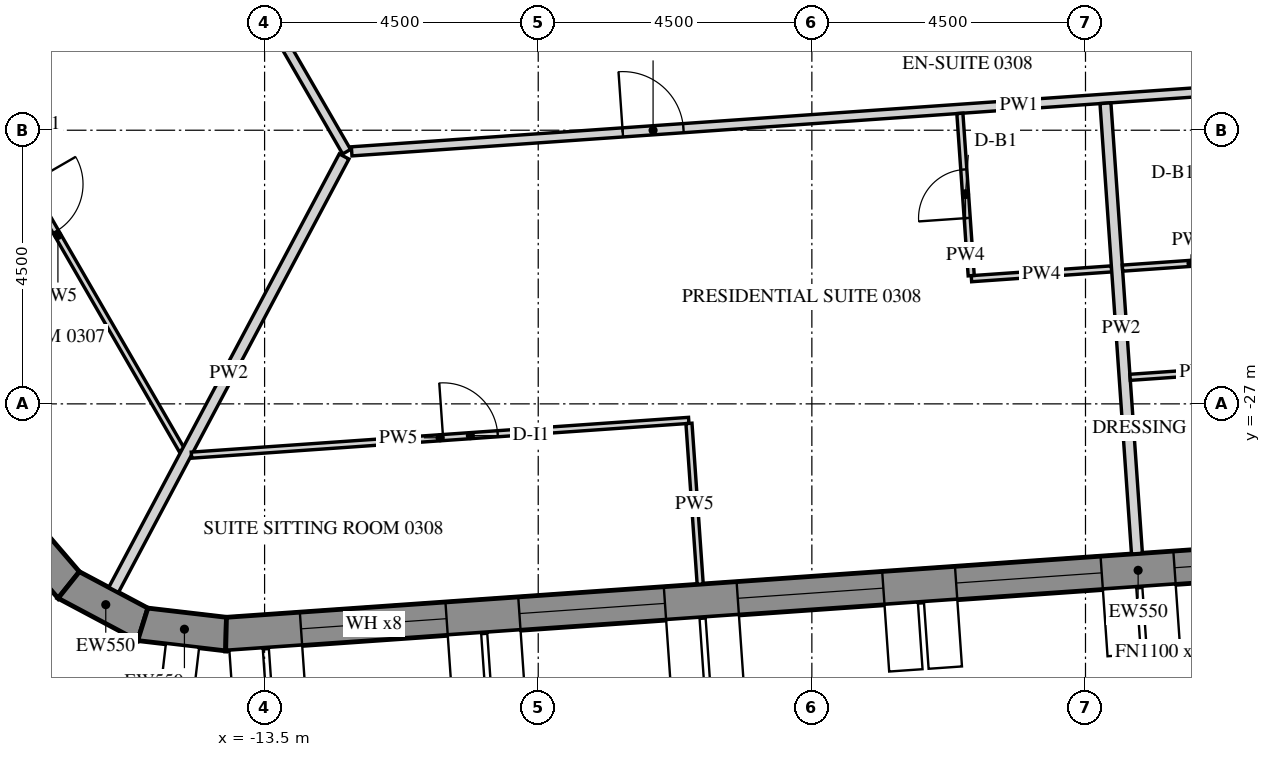
"""IFC4 building model, lengths in metres.
Left out: names, types, materials, properties, quantities, classifications, styles, units other than length and angle.
Written with IfcOpenShell. Run it as: python <this file> out.ifc"""

import sys

from ifc_helpers import new_model, si_unit, direction, frame, frame_2d, origin, place, context, subcontext, project, spatial, polyline, rectangle, outline, extrude, element, fill, save


model = new_model("IFC4")
c1 = context("Model", 3, precision=1e-05, world=origin(), true_north=direction((0.0, 1.0)))
c2 = subcontext(c1, "Body", "Model", "MODEL_VIEW")
j1 = project(units=[si_unit("LENGTHUNIT", "METRE"), si_unit("PLANEANGLEUNIT", "RADIAN")], contexts=[c1])
p1 = place(None, origin())
s1 = spatial("IfcSite", under=j1, at=p1, CompositionType="ELEMENT")
p2 = place(p1, origin())
s2 = spatial("IfcBuilding", under=s1, at=p2, CompositionType="ELEMENT")
p3 = place(p2, frame((0.0, 0.0, 60.9)))
s3 = spatial("IfcBuildingStorey", under=s2, at=p3, CompositionType="ELEMENT", Elevation=60.9)
p4 = place(p3, frame((-17.619, -28.932, -0.15), z_axis=(0.0, 0.0, 1.0), x_axis=(0.651621950847, -0.758543890078, 0.0)))
e1 = element("IfcWall", 1, at=p4, inside=s3, PredefinedType="SOLIDWALL", context=c2, shape_type="SweptSolid", body=[
    extrude(outline(polyline([(-0.026, -0.275), (1.431, -0.275), (1.327, 0.275), (0.026, 0.275), (-0.026, -0.275)])), origin(), (0.0, 0.0, 1.0), 3.9),
])
p5 = place(p3, frame((-16.721, -29.979, -0.15), z_axis=(0.0, 0.0, 1.0), x_axis=(0.882994189209, -0.469383917304, 0.0)))
e2 = element("IfcWall", 2, at=p5, inside=s3, PredefinedType="SOLIDWALL", context=c2, shape_type="SweptSolid", body=[
    extrude(outline(polyline([(-0.052, -0.275), (1.431, -0.275), (1.327, 0.275), (0.052, 0.275), (-0.052, -0.275)])), origin(), (0.0, 0.0, 1.0), 3.9),
])
p6 = place(p3, frame((-15.503, -30.626, -0.15), z_axis=(0.0, 0.0, 1.0), x_axis=(0.993232537394, -0.11614269956, 0.0)))
e3 = element("IfcWall", 3, at=p6, inside=s3, PredefinedType="SOLIDWALL", context=c2, shape_type="SweptSolid", body=[
    extrude(outline(polyline([(-0.052, -0.275), (1.405, -0.275), (1.353, 0.275), (0.052, 0.275), (-0.052, -0.275)])), origin(), (0.0, 0.0, 1.0), 3.9),
])
p7 = place(p3, frame((-14.134, -30.786, -0.15), z_axis=(0.0, 0.0, 1.0), x_axis=(0.997564037441, 0.069756657061, 0.0)))
e4 = element("IfcWall", 4, at=p7, inside=s3, PredefinedType="SOLIDWALL", context=c2, shape_type="SweptSolid", body=[
    extrude(outline(polyline([(-0.026, -0.275), (30.094, -0.275), (30.049, 0.275), (0.026, 0.275), (-0.026, -0.275)])), origin(), (0.0, 0.0, 1.0), 3.9),
])
p8 = place(p7, frame((1.236, 0.0, 1.05)))
e5 = element("IfcOpeningElement", 5, at=p8, cuts=e4, PredefinedType="OPENING", context=c2, shape_type="SweptSolid", body=[
    extrude(rectangle(XDim=2.4, YDim=2.4, at=frame_2d((1.2, 1.2))), frame((0.0, 0.285, 0.0), z_axis=(0.0, -1.0, 0.0), x_axis=(1.0, 0.0, 0.0)), (0.0, 0.0, 1.0), 0.57),
])
p9 = place(p7, frame((4.835, 0.0, 1.05)))
e6 = element("IfcOpeningElement", 6, at=p9, cuts=e4, PredefinedType="OPENING", context=c2, shape_type="SweptSolid", body=[
    extrude(rectangle(XDim=2.4, YDim=2.4, at=frame_2d((1.2, 1.2))), frame((0.0, 0.285, 0.0), z_axis=(0.0, -1.0, 0.0), x_axis=(1.0, 0.0, 0.0)), (0.0, 0.0, 1.0), 0.57),
])
p10 = place(p7, frame((8.436, 0.0, 1.05)))
e7 = element("IfcOpeningElement", 7, at=p10, cuts=e4, PredefinedType="OPENING", context=c2, shape_type="SweptSolid", body=[
    extrude(rectangle(XDim=2.4, YDim=2.4, at=frame_2d((1.2, 1.2))), frame((0.0, 0.285, 0.0), z_axis=(0.0, -1.0, 0.0), x_axis=(1.0, 0.0, 0.0)), (0.0, 0.0, 1.0), 0.57),
])
p11 = place(p7, frame((12.035, 0.0, 1.05)))
e8 = element("IfcOpeningElement", 8, at=p11, cuts=e4, PredefinedType="OPENING", context=c2, shape_type="SweptSolid", body=[
    extrude(rectangle(XDim=2.4, YDim=2.4, at=frame_2d((1.2, 1.2))), frame((0.0, 0.285, 0.0), z_axis=(0.0, -1.0, 0.0), x_axis=(1.0, 0.0, 0.0)), (0.0, 0.0, 1.0), 0.57),
])
p12 = place(p7, frame((15.635, 0.0, 1.05)))
e9 = element("IfcOpeningElement", 9, at=p12, cuts=e4, PredefinedType="OPENING", context=c2, shape_type="SweptSolid", body=[
    extrude(rectangle(XDim=2.4, YDim=2.4, at=frame_2d((1.2, 1.2))), frame((0.0, 0.285, 0.0), z_axis=(0.0, -1.0, 0.0), x_axis=(1.0, 0.0, 0.0)), (0.0, 0.0, 1.0), 0.57),
])
p13 = place(p7, frame((19.236, 0.0, 1.05)))
e10 = element("IfcOpeningElement", 10, at=p13, cuts=e4, PredefinedType="OPENING", context=c2, shape_type="SweptSolid", body=[
    extrude(rectangle(XDim=2.4, YDim=2.4, at=frame_2d((1.2, 1.2))), frame((0.0, 0.285, 0.0), z_axis=(0.0, -1.0, 0.0), x_axis=(1.0, 0.0, 0.0)), (0.0, 0.0, 1.0), 0.57),
])
p14 = place(p7, frame((22.835, 0.0, 1.05)))
e11 = element("IfcOpeningElement", 11, at=p14, cuts=e4, PredefinedType="OPENING", context=c2, shape_type="SweptSolid", body=[
    extrude(rectangle(XDim=2.4, YDim=2.4, at=frame_2d((1.2, 1.2))), frame((0.0, 0.285, 0.0), z_axis=(0.0, -1.0, 0.0), x_axis=(1.0, 0.0, 0.0)), (0.0, 0.0, 1.0), 0.57),
])
p15 = place(p7, frame((26.436, 0.0, 1.05)))
e12 = element("IfcOpeningElement", 12, at=p15, cuts=e4, PredefinedType="OPENING", context=c2, shape_type="SweptSolid", body=[
    extrude(rectangle(XDim=2.4, YDim=2.4, at=frame_2d((1.2, 1.2))), frame((0.0, 0.285, 0.0), z_axis=(0.0, -1.0, 0.0), x_axis=(1.0, 0.0, 0.0)), (0.0, 0.0, 1.0), 0.57),
])
p16 = place(p3, frame((-24.09, -2.175, 0.0), z_axis=(0.0, 0.0, 1.0), x_axis=(0.499996832073, -0.86602723278, 0.0)))
e13 = element("IfcWall", 13, at=p16, inside=s3, PredefinedType="PARTITIONING", context=c2, shape_type="SweptSolid", body=[
    extrude(rectangle(XDim=23.877, YDim=0.15, at=frame_2d((11.938, 0.0))), origin(), (0.0, 0.0, 1.0), 2.988),
])
p17 = place(p16, frame((6.443, 0.0, 0.0)))
e14 = element("IfcOpeningElement", 14, at=p17, cuts=e13, PredefinedType="OPENING", context=c2, shape_type="SweptSolid", body=[
    extrude(rectangle(XDim=1.0, YDim=2.1, at=frame_2d((0.5, 1.05))), frame((0.0, 0.085, 0.0), z_axis=(0.0, -1.0, 0.0), x_axis=(1.0, 0.0, 0.0)), (0.0, 0.0, 1.0), 0.17),
])
p18 = place(p16, frame((18.425, 0.0, 0.0)))
e15 = element("IfcOpeningElement", 15, at=p18, cuts=e13, PredefinedType="OPENING", context=c2, shape_type="SweptSolid", body=[
    extrude(rectangle(XDim=1.0, YDim=2.1, at=frame_2d((0.5, 1.05))), frame((0.0, 0.085, 0.0), z_axis=(0.0, -1.0, 0.0), x_axis=(1.0, 0.0, 0.0)), (0.0, 0.0, 1.0), 0.17),
])
p19 = place(p3, frame((-12.068, -22.847, 0.0), z_axis=(0.0, 0.0, 1.0), x_axis=(0.99756437486, 0.069751831595, 0.0)))
e16 = element("IfcWall", 16, at=p19, inside=s3, PredefinedType="PARTITIONING", context=c2, shape_type="SweptSolid", body=[
    extrude(rectangle(XDim=22.002, YDim=0.15, at=frame_2d((11.001, 0.0))), origin(), (0.0, 0.0, 1.0), 2.988),
])
p20 = place(p19, frame((4.469, 0.0, 0.0)))
e17 = element("IfcOpeningElement", 17, at=p20, cuts=e16, PredefinedType="OPENING", context=c2, shape_type="SweptSolid", body=[
    extrude(rectangle(XDim=1.0, YDim=2.1, at=frame_2d((0.5, 1.05))), frame((0.0, 0.085, 0.0), z_axis=(0.0, -1.0, 0.0), x_axis=(1.0, 0.0, 0.0)), (0.0, 0.0, 1.0), 0.17),
])
p21 = place(p19, frame((17.912, 0.0, 0.0)))
e18 = element("IfcOpeningElement", 18, at=p21, cuts=e16, PredefinedType="OPENING", context=c2, shape_type="SweptSolid", body=[
    extrude(rectangle(XDim=1.0, YDim=2.1, at=frame_2d((0.5, 1.05))), frame((0.0, 0.085, 0.0), z_axis=(0.0, -1.0, 0.0), x_axis=(1.0, 0.0, 0.0)), (0.0, 0.0, 1.0), 0.17),
])
p22 = place(p3, frame((-18.936, -20.702, 0.0), z_axis=(0.0, 0.0, 1.0), x_axis=(0.49998354646, -0.866034903032, 0.0)))
e19 = element("IfcWall", 19, at=p22, inside=s3, PredefinedType="PARTITIONING", context=c2, shape_type="SweptSolid", body=[
    extrude(rectangle(XDim=8.148, YDim=0.1, at=frame_2d((4.074, 0.0))), origin(), (0.0, 0.0, 1.0), 2.988),
])
p23 = place(p22, frame((3.1, 0.0, 0.0)))
e20 = element("IfcOpeningElement", 20, at=p23, cuts=e19, PredefinedType="OPENING", context=c2, shape_type="SweptSolid", body=[
    extrude(rectangle(XDim=0.9, YDim=2.1, at=frame_2d((0.45, 1.05))), frame((0.0, 0.06, 0.0), z_axis=(0.0, -1.0, 0.0), x_axis=(1.0, 0.0, 0.0)), (0.0, 0.0, 1.0), 0.12),
])
p24 = place(p3, frame((-15.983, -30.059, 0.0), z_axis=(0.0, 0.0, 1.0), x_axis=(0.469476547643, 0.882944942346, 0.0)))
e21 = element("IfcWall", 21, at=p24, inside=s3, PredefinedType="PARTITIONING", context=c2, shape_type="SweptSolid", body=[
    extrude(rectangle(XDim=8.073, YDim=0.18, at=frame_2d((4.037, 0.0))), origin(), (0.0, 0.0, 1.0), 2.988),
])
p25 = place(p3, frame((0.428, -24.781, 0.0), z_axis=(0.0, 0.0, 1.0), x_axis=(-0.997563824095, -0.069759707979, 0.0)))
e22 = element("IfcWall", 22, at=p25, inside=s3, PredefinedType="PARTITIONING", context=c2, shape_type="SweptSolid", body=[
    extrude(rectangle(XDim=2.31, YDim=0.1, at=frame_2d((1.155, 0.0))), origin(), (0.0, 0.0, 1.0), 2.988),
])
p26 = place(p3, frame((-1.879, -24.892, 0.0), z_axis=(0.0, 0.0, 1.0), x_axis=(-0.069722873391, 0.997566399257, 0.0)))
e23 = element("IfcWall", 23, at=p26, inside=s3, PredefinedType="PARTITIONING", context=c2, shape_type="SweptSolid", body=[
    extrude(rectangle(XDim=2.675, YDim=0.1, at=frame_2d((1.338, 0.0))), origin(), (0.0, 0.0, 1.0), 2.988),
])
p27 = place(p26, frame((0.95, 0.0, 0.0)))
e24 = element("IfcOpeningElement", 24, at=p27, cuts=e23, PredefinedType="OPENING", context=c2, shape_type="SweptSolid", body=[
    extrude(rectangle(XDim=0.8, YDim=2.1, at=frame_2d((0.4, 1.05))), frame((0.0, 0.06, 0.0), z_axis=(0.0, -1.0, 0.0), x_axis=(1.0, 0.0, 0.0)), (0.0, 0.0, 1.0), 0.12),
])
p28 = place(p3, frame((-14.703, -27.844, 0.0), z_axis=(0.0, 0.0, 1.0), x_axis=(0.997562679052, 0.069776080157, 0.0)))
e25 = element("IfcWall", 25, at=p28, inside=s3, PredefinedType="PARTITIONING", context=c2, shape_type="SweptSolid", body=[
    extrude(rectangle(XDim=8.198, YDim=0.1, at=frame_2d((4.099, 0.0))), origin(), (0.0, 0.0, 1.0), 2.988),
])
p29 = place(p28, frame((4.148, 0.0, 0.0)))
e26 = element("IfcOpeningElement", 26, at=p29, cuts=e25, PredefinedType="OPENING", context=c2, shape_type="SweptSolid", body=[
    extrude(rectangle(XDim=0.9, YDim=2.1, at=frame_2d((0.45, 1.05))), frame((0.0, 0.06, 0.0), z_axis=(0.0, -1.0, 0.0), x_axis=(1.0, 0.0, 0.0)), (0.0, 0.0, 1.0), 0.12),
])
p30 = place(p3, frame((-6.521, -27.322, 0.0), z_axis=(0.0, 0.0, 1.0), x_axis=(0.069832794838, -0.997558710435, 0.0)))
e27 = element("IfcWall", 27, at=p30, inside=s3, PredefinedType="PARTITIONING", context=c2, shape_type="SweptSolid", body=[
    extrude(rectangle(XDim=2.65, YDim=0.1, at=frame_2d((1.325, 0.0))), origin(), (0.0, 0.0, 1.0), 2.988),
])
p31 = place(p3, frame((0.846, -29.463, 0.0), z_axis=(0.0, 0.0, 1.0), x_axis=(-0.069774810252, 0.997562767877, 0.0)))
e28 = element("IfcWall", 28, at=p31, inside=s3, PredefinedType="PARTITIONING", context=c2, shape_type="SweptSolid", body=[
    extrude(rectangle(XDim=7.425, YDim=0.18, at=frame_2d((3.712, 0.0))), origin(), (0.0, 0.0, 1.0), 2.988),
])
p32 = place(p3, frame((2.988, -26.406, 0.0), z_axis=(0.0, 0.0, 1.0), x_axis=(-0.997561825928, -0.069788275888, 0.0)))
e29 = element("IfcWall", 29, at=p32, inside=s3, PredefinedType="PARTITIONING", context=c2, shape_type="SweptSolid", body=[
    extrude(rectangle(XDim=2.26, YDim=0.1, at=frame_2d((1.13, 0.0))), origin(), (0.0, 0.0, 1.0), 2.988),
])
p33 = place(p3, frame((0.608, -24.768, 0.0), z_axis=(0.0, 0.0, 1.0), x_axis=(0.997569341134, 0.069680769442, 0.0)))
e30 = element("IfcWall", 30, at=p33, inside=s3, PredefinedType="PARTITIONING", context=c2, shape_type="SweptSolid", body=[
    extrude(rectangle(XDim=2.26, YDim=0.1, at=frame_2d((1.13, 0.0))), origin(), (0.0, 0.0, 1.0), 2.988),
])
p34 = place(p8, frame((0.0, 0.205, 0.0)))
e31 = element("IfcWindow", 31, at=p34, inside=s3, PartitioningType="DOUBLE_PANEL_VERTICAL", PredefinedType="WINDOW", context=c2, shape_type="SweptSolid", body=[
    extrude(rectangle(XDim=2.4, YDim=2.4, at=frame_2d((1.2, 1.2))), frame((0.0, 0.03, 0.0), z_axis=(0.0, -1.0, 0.0), x_axis=(1.0, 0.0, 0.0)), (0.0, 0.0, 1.0), 0.06),
])
fill(e5, e31)
p35 = place(p9, frame((0.0, 0.205, 0.0)))
e32 = element("IfcWindow", 32, at=p35, inside=s3, PartitioningType="DOUBLE_PANEL_VERTICAL", PredefinedType="WINDOW", context=c2, shape_type="SweptSolid", body=[
    extrude(rectangle(XDim=2.4, YDim=2.4, at=frame_2d((1.2, 1.2))), frame((0.0, 0.03, 0.0), z_axis=(0.0, -1.0, 0.0), x_axis=(1.0, 0.0, 0.0)), (0.0, 0.0, 1.0), 0.06),
])
fill(e6, e32)
p36 = place(p10, frame((0.0, 0.205, 0.0)))
e33 = element("IfcWindow", 33, at=p36, inside=s3, PartitioningType="DOUBLE_PANEL_VERTICAL", PredefinedType="WINDOW", context=c2, shape_type="SweptSolid", body=[
    extrude(rectangle(XDim=2.4, YDim=2.4, at=frame_2d((1.2, 1.2))), frame((0.0, 0.03, 0.0), z_axis=(0.0, -1.0, 0.0), x_axis=(1.0, 0.0, 0.0)), (0.0, 0.0, 1.0), 0.06),
])
fill(e7, e33)
p37 = place(p11, frame((0.0, 0.205, 0.0)))
e34 = element("IfcWindow", 34, at=p37, inside=s3, PartitioningType="DOUBLE_PANEL_VERTICAL", PredefinedType="WINDOW", context=c2, shape_type="SweptSolid", body=[
    extrude(rectangle(XDim=2.4, YDim=2.4, at=frame_2d((1.2, 1.2))), frame((0.0, 0.03, 0.0), z_axis=(0.0, -1.0, 0.0), x_axis=(1.0, 0.0, 0.0)), (0.0, 0.0, 1.0), 0.06),
])
fill(e8, e34)
p38 = place(p12, frame((0.0, 0.205, 0.0)))
e35 = element("IfcWindow", 35, at=p38, inside=s3, PartitioningType="DOUBLE_PANEL_VERTICAL", PredefinedType="WINDOW", context=c2, shape_type="SweptSolid", body=[
    extrude(rectangle(XDim=2.4, YDim=2.4, at=frame_2d((1.2, 1.2))), frame((0.0, 0.03, 0.0), z_axis=(0.0, -1.0, 0.0), x_axis=(1.0, 0.0, 0.0)), (0.0, 0.0, 1.0), 0.06),
])
fill(e9, e35)
p39 = place(p23, origin())
e36 = element("IfcDoor", 36, at=p39, inside=s3, OperationType="SINGLE_SWING_RIGHT", PredefinedType="DOOR", context=c2, shape_type="SweptSolid", body=[
    extrude(rectangle(XDim=0.9, YDim=2.1, at=frame_2d((0.45, 1.05))), frame((0.0, 0.025, 0.0), z_axis=(0.0, -1.0, 0.0), x_axis=(1.0, 0.0, 0.0)), (0.0, 0.0, 1.0), 0.05),
])
fill(e20, e36)
p40 = place(p20, origin())
e37 = element("IfcDoor", 37, at=p40, inside=s3, OperationType="SINGLE_SWING_RIGHT", PredefinedType="DOOR", context=c2, shape_type="SweptSolid", body=[
    extrude(rectangle(XDim=1.0, YDim=2.1, at=frame_2d((0.5, 1.05))), frame((0.0, 0.025, 0.0), z_axis=(0.0, -1.0, 0.0), x_axis=(1.0, 0.0, 0.0)), (0.0, 0.0, 1.0), 0.05),
])
fill(e17, e37)
p41 = place(p27, origin())
e38 = element("IfcDoor", 38, at=p41, inside=s3, OperationType="SINGLE_SWING_RIGHT", PredefinedType="DOOR", context=c2, shape_type="SweptSolid", body=[
    extrude(rectangle(XDim=0.8, YDim=2.1, at=frame_2d((0.4, 1.05))), frame((0.0, 0.025, 0.0), z_axis=(0.0, -1.0, 0.0), x_axis=(1.0, 0.0, 0.0)), (0.0, 0.0, 1.0), 0.05),
])
fill(e24, e38)
p42 = place(p29, origin())
e39 = element("IfcDoor", 39, at=p42, inside=s3, OperationType="SINGLE_SWING_LEFT", PredefinedType="DOOR", context=c2, shape_type="SweptSolid", body=[
    extrude(rectangle(XDim=0.9, YDim=2.1, at=frame_2d((0.45, 1.05))), frame((0.0, 0.025, 0.0), z_axis=(0.0, -1.0, 0.0), x_axis=(1.0, 0.0, 0.0)), (0.0, 0.0, 1.0), 0.05),
])
fill(e26, e39)
save(model, sys.argv[1])
